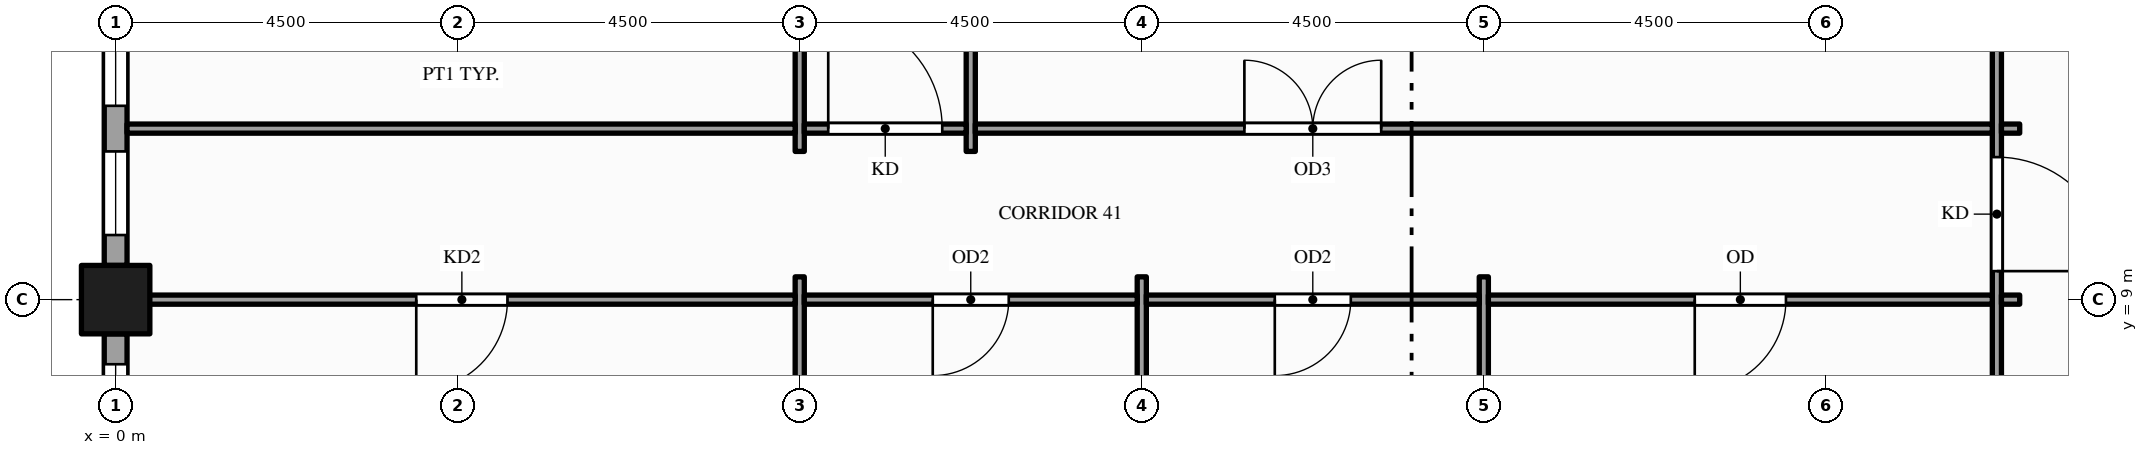
"""IFC4 building model, lengths in metres.
Left out: names, types, materials, properties, quantities, classifications, styles, units other than length and angle.
Written with IfcOpenShell. Run it as: python <this file> out.ifc"""

import sys

from ifc_helpers import new_model, si_unit, direction, frame, frame_2d, origin, origin_2d, place, context, subcontext, project, spatial, rectangle, hollow_rectangle, extrude, element, fill, save


model = new_model("IFC4")
c1 = context("Model", 3, precision=1e-05, world=origin(), true_north=direction((0.0, 1.0)))
c2 = subcontext(c1, "Body", "Model", "MODEL_VIEW")
j1 = project(units=[si_unit("LENGTHUNIT", "METRE"), si_unit("PLANEANGLEUNIT", "RADIAN")], contexts=[c1])
p1 = place(None, origin())
s1 = spatial("IfcSite", under=j1, at=p1, CompositionType="ELEMENT")
p2 = place(p1, origin())
s2 = spatial("IfcBuilding", under=s1, at=p2, CompositionType="ELEMENT")
p3 = place(p2, frame((0.0, 0.0, 159.0)))
s3 = spatial("IfcBuildingStorey", under=s2, at=p3, CompositionType="ELEMENT", Elevation=159.0)
p4 = place(p3, frame((0.0, 9.0, -0.15), z_axis=(0.0, 0.0, 1.0), x_axis=(1.0, 0.0, 0.0)))
e1 = element("IfcColumn", 1, at=p4, inside=s3, PredefinedType="COLUMN", context=c2, shape_type="SweptSolid", body=[
    extrude(hollow_rectangle(XDim=0.9, YDim=0.9, WallThickness=0.045, at=origin_2d()), origin(), (0.0, 0.0, 1.0), 4.0),
])
p5 = place(p3, frame((0.0, 13.05, 0.0), z_axis=(0.0, 0.0, 1.0), x_axis=(0.0, -1.0, 0.0)))
e2 = element("IfcWall", 2, at=p5, inside=s3, PredefinedType="STANDARD", context=c2, shape_type="SweptSolid", body=[
    extrude(rectangle(XDim=3.6, YDim=0.3, at=frame_2d((1.8, 0.0))), origin(), (0.0, 0.0, 1.0), 3.149),
])
p6 = place(p5, frame((0.4, 0.0, 0.9)))
e3 = element("IfcOpeningElement", 3, at=p6, cuts=e2, PredefinedType="OPENING", context=c2, shape_type="SweptSolid", body=[
    extrude(rectangle(XDim=1.1, YDim=2.0, at=frame_2d((0.55, 1.0))), frame((0.0, 0.16, 0.0), z_axis=(0.0, -1.0, 0.0), x_axis=(1.0, 0.0, 0.0)), (0.0, 0.0, 1.0), 0.32),
])
p7 = place(p5, frame((2.1, 0.0, 0.9)))
e4 = element("IfcOpeningElement", 4, at=p7, cuts=e2, PredefinedType="OPENING", context=c2, shape_type="SweptSolid", body=[
    extrude(rectangle(XDim=1.1, YDim=2.0, at=frame_2d((0.55, 1.0))), frame((0.0, 0.16, 0.0), z_axis=(0.0, -1.0, 0.0), x_axis=(1.0, 0.0, 0.0)), (0.0, 0.0, 1.0), 0.32),
])
p8 = place(p3, frame((0.0, 8.55, 0.0), z_axis=(0.0, 0.0, 1.0), x_axis=(0.0, -1.0, 0.0)))
e5 = element("IfcWall", 5, at=p8, inside=s3, PredefinedType="STANDARD", context=c2, shape_type="SweptSolid", body=[
    extrude(rectangle(XDim=3.6, YDim=0.3, at=frame_2d((1.8, 0.0))), origin(), (0.0, 0.0, 1.0), 3.149),
])
p9 = place(p8, frame((0.4, 0.0, 0.9)))
e6 = element("IfcOpeningElement", 6, at=p9, cuts=e5, PredefinedType="OPENING", context=c2, shape_type="SweptSolid", body=[
    extrude(rectangle(XDim=1.1, YDim=2.0, at=frame_2d((0.55, 1.0))), frame((0.0, 0.16, 0.0), z_axis=(0.0, -1.0, 0.0), x_axis=(1.0, 0.0, 0.0)), (0.0, 0.0, 1.0), 0.32),
])
p10 = place(p8, frame((2.1, 0.0, 0.9)))
e7 = element("IfcOpeningElement", 7, at=p10, cuts=e5, PredefinedType="OPENING", context=c2, shape_type="SweptSolid", body=[
    extrude(rectangle(XDim=1.1, YDim=2.0, at=frame_2d((0.55, 1.0))), frame((0.0, 0.16, 0.0), z_axis=(0.0, -1.0, 0.0), x_axis=(1.0, 0.0, 0.0)), (0.0, 0.0, 1.0), 0.32),
])
p11 = place(p3, frame((9.0, 3.875, 0.0), z_axis=(0.0, 0.0, 1.0), x_axis=(0.0, 1.0, 0.0)))
e8 = element("IfcWall", 8, at=p11, inside=s3, PredefinedType="PARTITIONING", context=c2, shape_type="SweptSolid", body=[
    extrude(rectangle(XDim=5.425, YDim=0.12, at=frame_2d((2.712, 0.0))), origin(), (0.0, 0.0, 1.0), 2.87),
])
p12 = place(p3, frame((9.0, 10.95, 0.0), z_axis=(0.0, 0.0, 1.0), x_axis=(0.0, 1.0, 0.0)))
e9 = element("IfcWall", 9, at=p12, inside=s3, PredefinedType="PARTITIONING", context=c2, shape_type="SweptSolid", body=[
    extrude(rectangle(XDim=20.85, YDim=0.12, at=frame_2d((10.425, 0.0))), origin(), (0.0, 0.0, 1.0), 2.6),
])
p13 = place(p12, frame((2.05, 0.0, 0.0)))
e10 = element("IfcOpeningElement", 10, at=p13, cuts=e9, PredefinedType="OPENING", context=c2, shape_type="SweptSolid", body=[
    extrude(rectangle(XDim=1.0, YDim=2.1, at=frame_2d((0.5, 1.05))), frame((0.0, 0.07, 0.0), z_axis=(0.0, -1.0, 0.0), x_axis=(1.0, 0.0, 0.0)), (0.0, 0.0, 1.0), 0.14),
])
p14 = place(p12, frame((6.55, 0.0, 0.0)))
e11 = element("IfcOpeningElement", 11, at=p14, cuts=e9, PredefinedType="OPENING", context=c2, shape_type="SweptSolid", body=[
    extrude(rectangle(XDim=1.0, YDim=2.1, at=frame_2d((0.5, 1.05))), frame((0.0, 0.07, 0.0), z_axis=(0.0, -1.0, 0.0), x_axis=(1.0, 0.0, 0.0)), (0.0, 0.0, 1.0), 0.14),
])
p15 = place(p12, frame((11.805, 0.0, 0.0)))
e12 = element("IfcOpeningElement", 12, at=p15, cuts=e9, PredefinedType="OPENING", context=c2, shape_type="SweptSolid", body=[
    extrude(rectangle(XDim=1.8, YDim=2.1, at=frame_2d((0.9, 1.05))), frame((0.0, 0.07, 0.0), z_axis=(0.0, -1.0, 0.0), x_axis=(1.0, 0.0, 0.0)), (0.0, 0.0, 1.0), 0.14),
])
p16 = place(p3, frame((11.25, 10.95, 0.0), z_axis=(0.0, 0.0, 1.0), x_axis=(0.0, 1.0, 0.0)))
e13 = element("IfcWall", 13, at=p16, inside=s3, PredefinedType="PARTITIONING", context=c2, shape_type="SweptSolid", body=[
    extrude(rectangle(XDim=20.85, YDim=0.12, at=frame_2d((10.425, 0.0))), origin(), (0.0, 0.0, 1.0), 2.6),
])
p17 = place(p16, frame((17.8, 0.0, 0.0)))
e14 = element("IfcOpeningElement", 14, at=p17, cuts=e13, PredefinedType="OPENING", context=c2, shape_type="SweptSolid", body=[
    extrude(rectangle(XDim=1.0, YDim=2.1, at=frame_2d((0.5, 1.05))), frame((0.0, 0.07, 0.0), z_axis=(0.0, -1.0, 0.0), x_axis=(1.0, 0.0, 0.0)), (0.0, 0.0, 1.0), 0.14),
])
p18 = place(p16, frame((4.2, 0.0, 0.0)))
e15 = element("IfcOpeningElement", 15, at=p18, cuts=e13, PredefinedType="OPENING", context=c2, shape_type="SweptSolid", body=[
    extrude(rectangle(XDim=1.2, YDim=2.1, at=frame_2d((0.6, 1.05))), frame((0.0, 0.07, 0.0), z_axis=(0.0, -1.0, 0.0), x_axis=(1.0, 0.0, 0.0)), (0.0, 0.0, 1.0), 0.14),
])
for number, where, z_axis, x_axis in (
    (16, (13.5, 0.15, 0.0), (0.0, 0.0, 1.0), (0.0, 1.0, 0.0)),
    (17, (18.0, 0.15, 0.0), (0.0, 0.0, 1.0), (0.0, 1.0, 0.0)),
):
    element("IfcWall", number, at=place(p3, frame(where, z_axis=z_axis, x_axis=x_axis)), inside=s3, PredefinedType="PARTITIONING", context=c2, shape_type="SweptSolid", body=[
        extrude(rectangle(XDim=9.15, YDim=0.12, at=frame_2d((4.575, 0.0))), origin(), (0.0, 0.0, 1.0), 2.87),
    ])
p19 = place(p3, frame((24.75, 1.65, 0.0), z_axis=(0.0, 0.0, 1.0), x_axis=(0.0, 1.0, 0.0)))
e18 = element("IfcWall", 18, at=p19, inside=s3, PredefinedType="PARTITIONING", context=c2, shape_type="SweptSolid", body=[
    extrude(rectangle(XDim=22.298, YDim=0.12, at=frame_2d((11.149, 0.0))), origin(), (0.0, 0.0, 1.0), 2.87),
])
p20 = place(p19, frame((7.725, 0.0, 0.0)))
e19 = element("IfcOpeningElement", 19, at=p20, cuts=e18, PredefinedType="OPENING", context=c2, shape_type="SweptSolid", body=[
    extrude(rectangle(XDim=1.5, YDim=2.1, at=frame_2d((0.75, 1.05))), frame((0.0, 0.07, 0.0), z_axis=(0.0, -1.0, 0.0), x_axis=(1.0, 0.0, 0.0)), (0.0, 0.0, 1.0), 0.14),
])
p21 = place(p19, frame((13.125, 0.0, 0.0)))
e20 = element("IfcOpeningElement", 20, at=p21, cuts=e18, PredefinedType="OPENING", context=c2, shape_type="SweptSolid", body=[
    extrude(rectangle(XDim=1.2, YDim=2.1, at=frame_2d((0.6, 1.05))), frame((0.0, 0.07, 0.0), z_axis=(0.0, -1.0, 0.0), x_axis=(1.0, 0.0, 0.0)), (0.0, 0.0, 1.0), 0.14),
])
p22 = place(p3, frame((0.15, 9.0, 0.0), z_axis=(0.0, 0.0, 1.0), x_axis=(1.0, 0.0, 0.0)))
e21 = element("IfcWall", 21, at=p22, inside=s3, PredefinedType="PARTITIONING", context=c2, shape_type="SweptSolid", body=[
    extrude(rectangle(XDim=8.79, YDim=0.12, at=frame_2d((4.395, 0.0))), origin(), (0.0, 0.0, 1.0), 2.87),
])
p23 = place(p22, frame((3.805, 0.0, 0.0)))
e22 = element("IfcOpeningElement", 22, at=p23, cuts=e21, PredefinedType="OPENING", context=c2, shape_type="SweptSolid", body=[
    extrude(rectangle(XDim=1.2, YDim=2.1, at=frame_2d((0.6, 1.05))), frame((0.0, 0.07, 0.0), z_axis=(0.0, -1.0, 0.0), x_axis=(1.0, 0.0, 0.0)), (0.0, 0.0, 1.0), 0.14),
])
p24 = place(p3, frame((9.06, 9.0, 0.0), z_axis=(0.0, 0.0, 1.0), x_axis=(1.0, 0.0, 0.0)))
e23 = element("IfcWall", 23, at=p24, inside=s3, PredefinedType="PARTITIONING", context=c2, shape_type="SweptSolid", body=[
    extrude(rectangle(XDim=4.38, YDim=0.12, at=frame_2d((2.19, 0.0))), origin(), (0.0, 0.0, 1.0), 2.87),
])
p25 = place(p24, frame((1.69, 0.0, 0.0)))
e24 = element("IfcOpeningElement", 24, at=p25, cuts=e23, PredefinedType="OPENING", context=c2, shape_type="SweptSolid", body=[
    extrude(rectangle(XDim=1.0, YDim=2.1, at=frame_2d((0.5, 1.05))), frame((0.0, 0.07, 0.0), z_axis=(0.0, -1.0, 0.0), x_axis=(1.0, 0.0, 0.0)), (0.0, 0.0, 1.0), 0.14),
])
p26 = place(p3, frame((13.56, 9.0, 0.0), z_axis=(0.0, 0.0, 1.0), x_axis=(1.0, 0.0, 0.0)))
e25 = element("IfcWall", 25, at=p26, inside=s3, PredefinedType="PARTITIONING", context=c2, shape_type="SweptSolid", body=[
    extrude(rectangle(XDim=4.38, YDim=0.12, at=frame_2d((2.19, 0.0))), origin(), (0.0, 0.0, 1.0), 2.87),
])
p27 = place(p26, frame((1.69, 0.0, 0.0)))
e26 = element("IfcOpeningElement", 26, at=p27, cuts=e25, PredefinedType="OPENING", context=c2, shape_type="SweptSolid", body=[
    extrude(rectangle(XDim=1.0, YDim=2.1, at=frame_2d((0.5, 1.05))), frame((0.0, 0.07, 0.0), z_axis=(0.0, -1.0, 0.0), x_axis=(1.0, 0.0, 0.0)), (0.0, 0.0, 1.0), 0.14),
])
p28 = place(p3, frame((18.06, 9.0, 0.0), z_axis=(0.0, 0.0, 1.0), x_axis=(1.0, 0.0, 0.0)))
e27 = element("IfcWall", 27, at=p28, inside=s3, PredefinedType="PARTITIONING", context=c2, shape_type="SweptSolid", body=[
    extrude(rectangle(XDim=6.63, YDim=0.12, at=frame_2d((3.315, 0.0))), origin(), (0.0, 0.0, 1.0), 2.87),
])
p29 = place(p28, frame((2.715, 0.0, 0.0)))
e28 = element("IfcOpeningElement", 28, at=p29, cuts=e27, PredefinedType="OPENING", context=c2, shape_type="SweptSolid", body=[
    extrude(rectangle(XDim=1.2, YDim=2.1, at=frame_2d((0.6, 1.05))), frame((0.0, 0.07, 0.0), z_axis=(0.0, -1.0, 0.0), x_axis=(1.0, 0.0, 0.0)), (0.0, 0.0, 1.0), 0.14),
])
p30 = place(p3, frame((24.81, 9.0, 0.0), z_axis=(0.0, 0.0, 1.0), x_axis=(1.0, 0.0, 0.0)))
e29 = element("IfcWall", 29, at=p30, inside=s3, PredefinedType="PARTITIONING", context=c2, shape_type="SweptSolid", body=[
    extrude(rectangle(XDim=0.24, YDim=0.12, at=frame_2d((0.12, 0.0))), origin(), (0.0, 0.0, 1.0), 2.87),
])
p31 = place(p3, frame((0.15, 11.25, 0.0), z_axis=(0.0, 0.0, 1.0), x_axis=(1.0, 0.0, 0.0)))
e30 = element("IfcWall", 30, at=p31, inside=s3, PredefinedType="PARTITIONING", context=c2, shape_type="SweptSolid", body=[
    extrude(rectangle(XDim=8.79, YDim=0.12, at=frame_2d((4.395, 0.0))), origin(), (0.0, 0.0, 1.0), 2.87),
])
p32 = place(p3, frame((9.06, 11.25, 0.0), z_axis=(0.0, 0.0, 1.0), x_axis=(1.0, 0.0, 0.0)))
e31 = element("IfcWall", 31, at=p32, inside=s3, PredefinedType="PARTITIONING", context=c2, shape_type="SweptSolid", body=[
    extrude(rectangle(XDim=2.13, YDim=0.12, at=frame_2d((1.065, 0.0))), origin(), (0.0, 0.0, 1.0), 2.87),
])
p33 = place(p32, frame((0.315, 0.0, 0.0)))
e32 = element("IfcOpeningElement", 32, at=p33, cuts=e31, PredefinedType="OPENING", context=c2, shape_type="SweptSolid", body=[
    extrude(rectangle(XDim=1.5, YDim=2.1, at=frame_2d((0.75, 1.05))), frame((0.0, 0.07, 0.0), z_axis=(0.0, -1.0, 0.0), x_axis=(1.0, 0.0, 0.0)), (0.0, 0.0, 1.0), 0.14),
])
p34 = place(p3, frame((11.31, 11.25, 0.0), z_axis=(0.0, 0.0, 1.0), x_axis=(1.0, 0.0, 0.0)))
e33 = element("IfcWall", 33, at=p34, inside=s3, PredefinedType="PARTITIONING", context=c2, shape_type="SweptSolid", body=[
    extrude(rectangle(XDim=13.38, YDim=0.12, at=frame_2d((6.69, 0.0))), origin(), (0.0, 0.0, 1.0), 2.87),
])
p35 = place(p34, frame((3.54, 0.0, 0.0)))
e34 = element("IfcOpeningElement", 34, at=p35, cuts=e33, PredefinedType="OPENING", context=c2, shape_type="SweptSolid", body=[
    extrude(rectangle(XDim=1.8, YDim=2.1, at=frame_2d((0.9, 1.05))), frame((0.0, 0.07, 0.0), z_axis=(0.0, -1.0, 0.0), x_axis=(1.0, 0.0, 0.0)), (0.0, 0.0, 1.0), 0.14),
])
p36 = place(p3, frame((24.81, 11.25, 0.0), z_axis=(0.0, 0.0, 1.0), x_axis=(1.0, 0.0, 0.0)))
e35 = element("IfcWall", 35, at=p36, inside=s3, PredefinedType="PARTITIONING", context=c2, shape_type="SweptSolid", body=[
    extrude(rectangle(XDim=0.24, YDim=0.12, at=frame_2d((0.12, 0.0))), origin(), (0.0, 0.0, 1.0), 2.87),
])
p37 = place(p6, origin())
e36 = element("IfcWindow", 36, at=p37, inside=s3, PartitioningType="SINGLE_PANEL", PredefinedType="WINDOW", context=c2, shape_type="SweptSolid", body=[
    extrude(rectangle(XDim=1.1, YDim=2.0, at=frame_2d((0.55, 1.0))), frame((0.0, 0.03, 0.0), z_axis=(0.0, -1.0, 0.0), x_axis=(1.0, 0.0, 0.0)), (0.0, 0.0, 1.0), 0.06),
])
fill(e3, e36)
p38 = place(p7, origin())
e37 = element("IfcWindow", 37, at=p38, inside=s3, PartitioningType="SINGLE_PANEL", PredefinedType="WINDOW", context=c2, shape_type="SweptSolid", body=[
    extrude(rectangle(XDim=1.1, YDim=2.0, at=frame_2d((0.55, 1.0))), frame((0.0, 0.03, 0.0), z_axis=(0.0, -1.0, 0.0), x_axis=(1.0, 0.0, 0.0)), (0.0, 0.0, 1.0), 0.06),
])
fill(e4, e37)
p39 = place(p9, origin())
e38 = element("IfcWindow", 38, at=p39, inside=s3, PartitioningType="SINGLE_PANEL", PredefinedType="WINDOW", context=c2, shape_type="SweptSolid", body=[
    extrude(rectangle(XDim=1.1, YDim=2.0, at=frame_2d((0.55, 1.0))), frame((0.0, 0.03, 0.0), z_axis=(0.0, -1.0, 0.0), x_axis=(1.0, 0.0, 0.0)), (0.0, 0.0, 1.0), 0.06),
])
fill(e6, e38)
p40 = place(p20, origin())
e39 = element("IfcDoor", 39, at=p40, inside=s3, OperationType="SINGLE_SWING_LEFT", PredefinedType="DOOR", context=c2, shape_type="SweptSolid", body=[
    extrude(rectangle(XDim=1.5, YDim=2.1, at=frame_2d((0.75, 1.05))), frame((0.0, 0.025, 0.0), z_axis=(0.0, -1.0, 0.0), x_axis=(1.0, 0.0, 0.0)), (0.0, 0.0, 1.0), 0.05),
])
fill(e19, e39)
p41 = place(p23, origin())
e40 = element("IfcDoor", 40, at=p41, inside=s3, OperationType="SINGLE_SWING_LEFT", PredefinedType="DOOR", context=c2, shape_type="SweptSolid", body=[
    extrude(rectangle(XDim=1.2, YDim=2.1, at=frame_2d((0.6, 1.05))), frame((0.0, 0.025, 0.0), z_axis=(0.0, -1.0, 0.0), x_axis=(1.0, 0.0, 0.0)), (0.0, 0.0, 1.0), 0.05),
])
fill(e22, e40)
p42 = place(p25, origin())
e41 = element("IfcDoor", 41, at=p42, inside=s3, OperationType="SINGLE_SWING_LEFT", PredefinedType="DOOR", context=c2, shape_type="SweptSolid", body=[
    extrude(rectangle(XDim=1.0, YDim=2.1, at=frame_2d((0.5, 1.05))), frame((0.0, 0.025, 0.0), z_axis=(0.0, -1.0, 0.0), x_axis=(1.0, 0.0, 0.0)), (0.0, 0.0, 1.0), 0.05),
])
fill(e24, e41)
p43 = place(p27, origin())
e42 = element("IfcDoor", 42, at=p43, inside=s3, OperationType="SINGLE_SWING_LEFT", PredefinedType="DOOR", context=c2, shape_type="SweptSolid", body=[
    extrude(rectangle(XDim=1.0, YDim=2.1, at=frame_2d((0.5, 1.05))), frame((0.0, 0.025, 0.0), z_axis=(0.0, -1.0, 0.0), x_axis=(1.0, 0.0, 0.0)), (0.0, 0.0, 1.0), 0.05),
])
fill(e26, e42)
p44 = place(p29, origin())
e43 = element("IfcDoor", 43, at=p44, inside=s3, OperationType="SINGLE_SWING_LEFT", PredefinedType="DOOR", context=c2, shape_type="SweptSolid", body=[
    extrude(rectangle(XDim=1.2, YDim=2.1, at=frame_2d((0.6, 1.05))), frame((0.0, 0.025, 0.0), z_axis=(0.0, -1.0, 0.0), x_axis=(1.0, 0.0, 0.0)), (0.0, 0.0, 1.0), 0.05),
])
fill(e28, e43)
p45 = place(p35, origin())
e44 = element("IfcDoor", 44, at=p45, inside=s3, OperationType="DOUBLE_DOOR_SINGLE_SWING", PredefinedType="DOOR", context=c2, shape_type="SweptSolid", body=[
    extrude(rectangle(XDim=1.8, YDim=2.1, at=frame_2d((0.9, 1.05))), frame((0.0, 0.025, 0.0), z_axis=(0.0, -1.0, 0.0), x_axis=(1.0, 0.0, 0.0)), (0.0, 0.0, 1.0), 0.05),
])
fill(e34, e44)
p46 = place(p33, origin())
e45 = element("IfcDoor", 45, at=p46, inside=s3, OperationType="SINGLE_SWING_LEFT", PredefinedType="DOOR", context=c2, shape_type="SweptSolid", body=[
    extrude(rectangle(XDim=1.5, YDim=2.1, at=frame_2d((0.75, 1.05))), frame((0.0, 0.025, 0.0), z_axis=(0.0, -1.0, 0.0), x_axis=(1.0, 0.0, 0.0)), (0.0, 0.0, 1.0), 0.05),
])
fill(e32, e45)
save(model, sys.argv[1])
